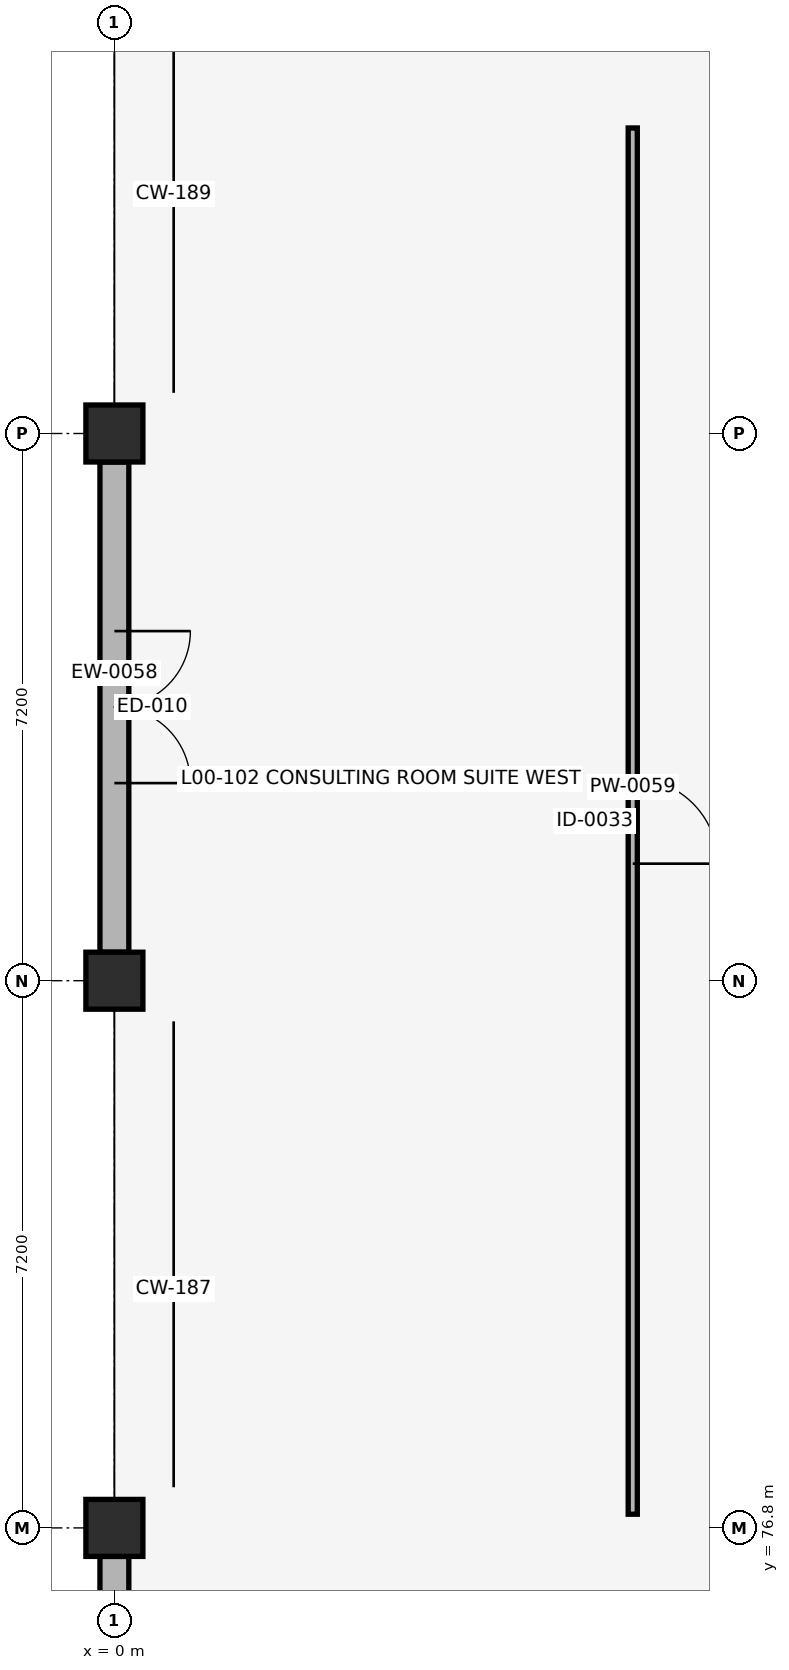
"""IFC4 building model, lengths in metres.
Left out: names, types, materials, properties, quantities, classifications, styles, units other than length and angle.
Written with IfcOpenShell. Run it as: python <this file> out.ifc"""

import sys

from ifc_helpers import new_model, si_unit, direction, frame, frame_2d, origin, origin_2d, place, context, subcontext, project, spatial, rectangle, circle, extrude, element, fill, save


model = new_model("IFC4")
c1 = context("Model", 3, precision=1e-05, world=origin(), true_north=direction((0.0, 1.0)))
c2 = subcontext(c1, "Body", "Model", "MODEL_VIEW")
j1 = project(units=[si_unit("LENGTHUNIT", "METRE"), si_unit("PLANEANGLEUNIT", "RADIAN")], contexts=[c1])
p1 = place(None, origin())
s1 = spatial("IfcSite", under=j1, at=p1, CompositionType="ELEMENT")
p2 = place(p1, origin())
s2 = spatial("IfcBuilding", under=s1, at=p2, CompositionType="ELEMENT")
p3 = place(p2, origin())
s3 = spatial("IfcBuildingStorey", under=s2, at=p3, CompositionType="ELEMENT", Elevation=0.0)
for number, where, z_axis, x_axis in (
    (1, (0.0, 76.8, -0.44), (0.0, 0.0, 1.0), (1.0, 0.0, 0.0)),
    (2, (0.0, 84.0, -0.44), (0.0, 0.0, 1.0), (1.0, 0.0, 0.0)),
    (3, (0.0, 91.2, -0.44), (0.0, 0.0, 1.0), (1.0, 0.0, 0.0)),
):
    element("IfcColumn", number, at=place(p3, frame(where, z_axis=z_axis, x_axis=x_axis)), inside=s3, PredefinedType="COLUMN", context=c2, shape_type="SweptSolid", body=[
        extrude(circle(Radius=0.375, at=origin_2d()), origin(), (0.0, 0.0, 1.0), 4.86),
    ])
p4 = place(p3, frame((0.0, 76.425, 0.0), z_axis=(0.0, 0.0, 1.0), x_axis=(0.0, -1.0, 0.0)))
e4 = element("IfcWall", 4, at=p4, inside=s3, PredefinedType="SOLIDWALL", context=c2, shape_type="SweptSolid", body=[
    extrude(rectangle(XDim=6.45, YDim=0.38, at=frame_2d((3.225, 0.0))), origin(), (0.0, 0.0, 1.0), 3.42),
])
p5 = place(p4, frame((2.575, 0.0, 0.72)))
e5 = element("IfcOpeningElement", 5, at=p5, cuts=e4, PredefinedType="OPENING", context=c2, shape_type="SweptSolid", body=[
    extrude(rectangle(XDim=1.3, YDim=2.32, at=frame_2d((0.65, 1.16))), frame((0.0, 0.2, 0.0), z_axis=(0.0, -1.0, 0.0), x_axis=(1.0, 0.0, 0.0)), (0.0, 0.0, 1.0), 0.4),
])
p6 = place(p3, frame((0.0, 90.825, 0.0), z_axis=(0.0, 0.0, 1.0), x_axis=(0.0, -1.0, 0.0)))
e6 = element("IfcWall", 6, at=p6, inside=s3, PredefinedType="SOLIDWALL", context=c2, shape_type="SweptSolid", body=[
    extrude(rectangle(XDim=6.45, YDim=0.38, at=frame_2d((3.225, 0.0))), origin(), (0.0, 0.0, 1.0), 3.42),
])
p7 = place(p6, frame((2.225, 0.0, 0.0)))
e7 = element("IfcOpeningElement", 7, at=p7, cuts=e6, PredefinedType="OPENING", context=c2, shape_type="SweptSolid", body=[
    extrude(rectangle(XDim=2.0, YDim=2.3, at=frame_2d((1.0, 1.15))), frame((0.0, 0.2, 0.0), z_axis=(0.0, -1.0, 0.0), x_axis=(1.0, 0.0, 0.0)), (0.0, 0.0, 1.0), 0.4),
])
p8 = place(p3, frame((6.82, 76.98, 0.0), z_axis=(0.0, 0.0, 1.0), x_axis=(0.0, 1.0, 0.0)))
e8 = element("IfcWall", 8, at=p8, inside=s3, PredefinedType="PARTITIONING", context=c2, shape_type="SweptSolid", body=[
    extrude(rectangle(XDim=18.24, YDim=0.12, at=frame_2d((9.12, 0.0))), origin(), (0.0, 0.0, 1.0), 3.46),
])
p9 = place(p8, frame((8.56, 0.0, 0.0)))
e9 = element("IfcOpeningElement", 9, at=p9, cuts=e8, PredefinedType="OPENING", context=c2, shape_type="SweptSolid", body=[
    extrude(rectangle(XDim=1.12, YDim=2.1, at=frame_2d((0.56, 1.05))), frame((0.0, 0.07, 0.0), z_axis=(0.0, -1.0, 0.0), x_axis=(1.0, 0.0, 0.0)), (0.0, 0.0, 1.0), 0.14),
])
p10 = place(p7, origin())
e10 = element("IfcDoor", 10, at=p10, inside=s3, OperationType="DOUBLE_DOOR_SINGLE_SWING", PredefinedType="DOOR", context=c2, shape_type="SweptSolid", body=[
    extrude(rectangle(XDim=2.0, YDim=2.3, at=frame_2d((1.0, 1.15))), frame((0.0, 0.025, 0.0), z_axis=(0.0, -1.0, 0.0), x_axis=(1.0, 0.0, 0.0)), (0.0, 0.0, 1.0), 0.05),
])
fill(e7, e10)
p11 = place(p9, origin())
e11 = element("IfcDoor", 11, at=p11, inside=s3, OperationType="SINGLE_SWING_RIGHT", PredefinedType="DOOR", context=c2, shape_type="SweptSolid", body=[
    extrude(rectangle(XDim=1.12, YDim=2.1, at=frame_2d((0.56, 1.05))), frame((0.0, 0.025, 0.0), z_axis=(0.0, -1.0, 0.0), x_axis=(1.0, 0.0, 0.0)), (0.0, 0.0, 1.0), 0.05),
])
fill(e9, e11)
save(model, sys.argv[1])
